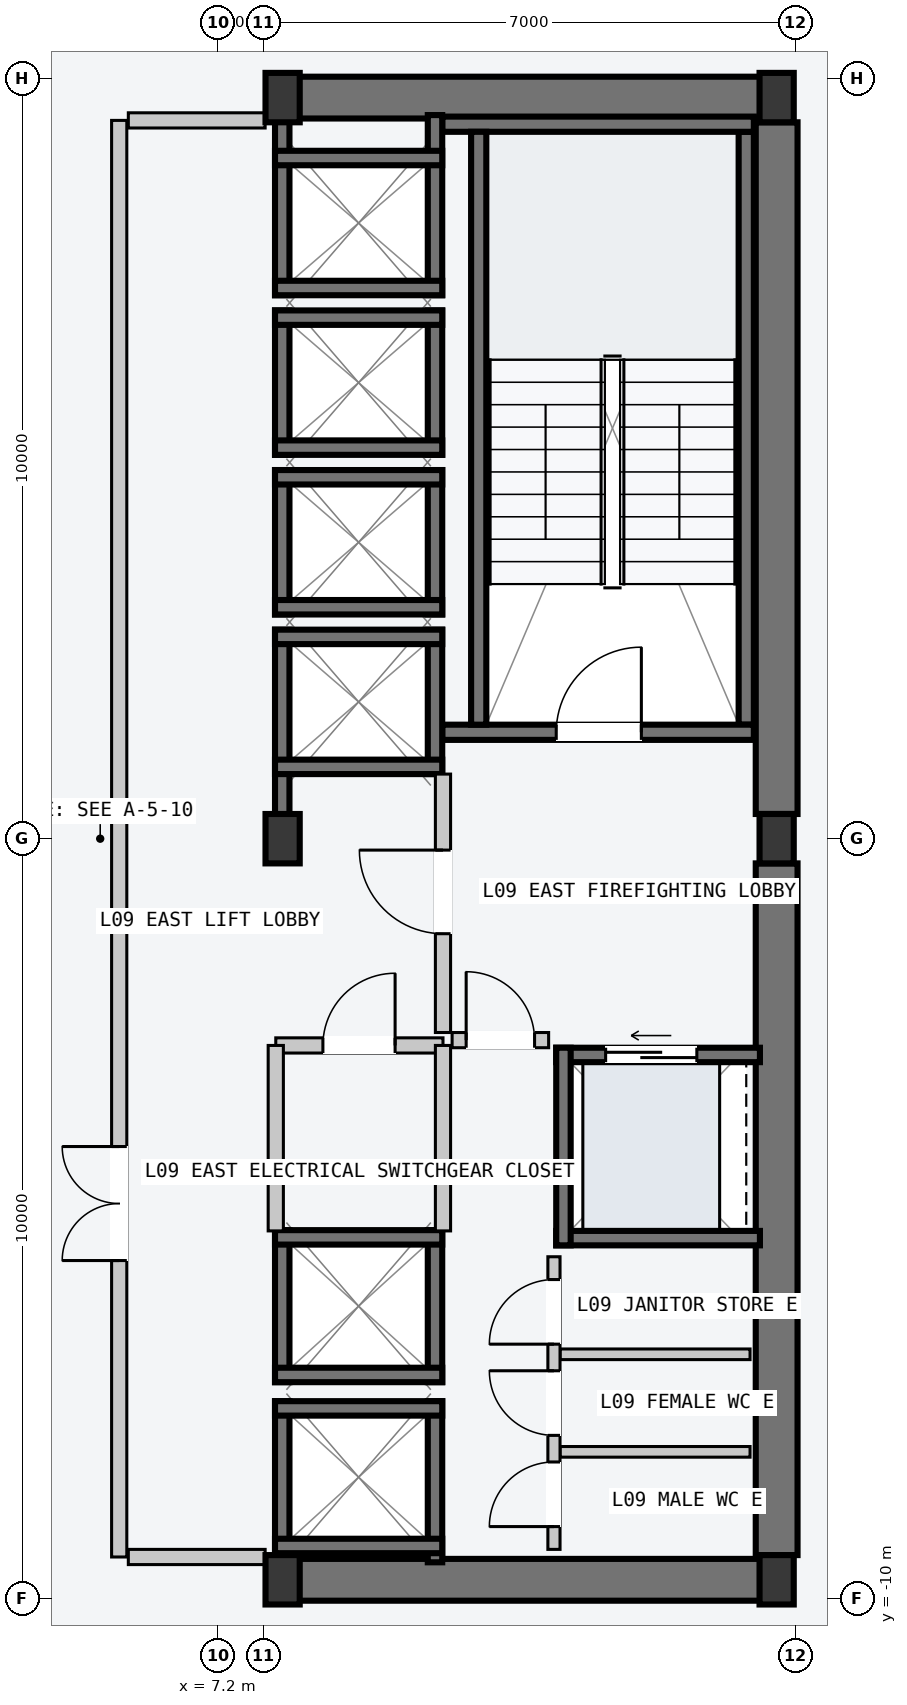
"""IFC4 building model, lengths in metres.
Left out: names, types, materials, properties, quantities, classifications, styles, units other than length and angle.
Written with IfcOpenShell. Run it as: python <this file> out.ifc"""

import sys

from ifc_helpers import new_model, si_unit, direction, frame, frame_2d, origin, origin_2d, place, context, subcontext, project, spatial, rectangle, i_section, extrude, element, fill, save


model = new_model("IFC4")
c1 = context("Model", 3, precision=1e-05, world=origin(), true_north=direction((0.0, 1.0)))
c2 = subcontext(c1, "Body", "Model", "MODEL_VIEW")
j1 = project(units=[si_unit("LENGTHUNIT", "METRE"), si_unit("PLANEANGLEUNIT", "RADIAN")], contexts=[c1])
p1 = place(None, origin())
s1 = spatial("IfcSite", under=j1, at=p1, CompositionType="ELEMENT")
p2 = place(p1, origin())
s2 = spatial("IfcBuilding", under=s1, at=p2, CompositionType="ELEMENT")
p3 = place(p2, frame((0.0, 0.0, 38.4)))
s3 = spatial("IfcBuildingStorey", under=s2, at=p3, CompositionType="ELEMENT", Elevation=38.4)
for number, where, z_axis, x_axis in (
    (1, (8.07, -9.75, -0.2), (0.0, 0.0, 1.0), (1.0, 0.0, 0.0)),
    (2, (8.07, 9.75, -0.2), (0.0, 0.0, 1.0), (1.0, 0.0, 0.0)),
):
    element("IfcWall", number, at=place(p3, frame(where, z_axis=z_axis, x_axis=x_axis)), inside=s3, PredefinedType="SHEAR", context=c2, shape_type="SweptSolid", body=[
        extrude(rectangle(XDim=6.46, YDim=0.55, at=frame_2d((3.23, 0.0))), origin(), (0.0, 0.0, 1.0), 3.6),
    ])
for number, where, z_axis, x_axis in (
    (3, (14.55, -9.425, -0.2), (0.0, 0.0, 1.0), (0.0, 1.0, 0.0)),
    (4, (14.55, 0.325, -0.2), (0.0, 0.0, 1.0), (0.0, 1.0, 0.0)),
):
    element("IfcWall", number, at=place(p3, frame(where, z_axis=z_axis, x_axis=x_axis)), inside=s3, PredefinedType="SHEAR", context=c2, shape_type="SweptSolid", body=[
        extrude(rectangle(XDim=9.1, YDim=0.55, at=frame_2d((4.55, 0.0))), origin(), (0.0, 0.0, 1.0), 3.6),
    ])
p4 = place(p3, frame((14.15, 1.5, -0.2), z_axis=(0.0, 0.0, 1.0), x_axis=(0.0, 1.0, 0.0)))
e5 = element("IfcWall", 5, at=p4, inside=s3, PredefinedType="SOLIDWALL", context=c2, shape_type="SweptSolid", body=[
    extrude(rectangle(XDim=7.8, YDim=0.2, at=frame_2d((3.9, 0.0))), origin(), (0.0, 0.0, 1.0), 3.6),
])
p5 = place(p3, frame((10.15, 1.4, -0.2), z_axis=(0.0, 0.0, 1.0), x_axis=(1.0, 0.0, 0.0)))
e6 = element("IfcWall", 6, at=p5, inside=s3, PredefinedType="SOLIDWALL", context=c2, shape_type="SweptSolid", body=[
    extrude(rectangle(XDim=4.1, YDim=0.2, at=frame_2d((2.05, 0.0))), origin(), (0.0, 0.0, 1.0), 3.6),
])
p6 = place(p5, frame((1.5, 0.0, 0.2)))
e7 = element("IfcOpeningElement", 7, at=p6, cuts=e6, PredefinedType="OPENING", context=c2, shape_type="SweptSolid", body=[
    extrude(rectangle(XDim=1.12, YDim=2.18, at=frame_2d((0.56, 1.09))), frame((0.0, 0.11, 0.0), z_axis=(0.0, -1.0, 0.0), x_axis=(1.0, 0.0, 0.0)), (0.0, 0.0, 1.0), 0.22),
])
p7 = place(p3, frame((10.15, 9.4, -0.2), z_axis=(0.0, 0.0, 1.0), x_axis=(1.0, 0.0, 0.0)))
e8 = element("IfcWall", 8, at=p7, inside=s3, PredefinedType="SOLIDWALL", context=c2, shape_type="SweptSolid", body=[
    extrude(rectangle(XDim=4.1, YDim=0.2, at=frame_2d((2.05, 0.0))), origin(), (0.0, 0.0, 1.0), 3.6),
])
p8 = place(p3, frame((10.63, 1.5, -0.2), z_axis=(0.0, 0.0, 1.0), x_axis=(0.0, 1.0, 0.0)))
e9 = element("IfcWall", 9, at=p8, inside=s3, PredefinedType="SOLIDWALL", context=c2, shape_type="SweptSolid", body=[
    extrude(rectangle(XDim=7.8, YDim=0.2, at=frame_2d((3.9, 0.0))), origin(), (0.0, 0.0, 1.0), 3.6),
])
for number, where, z_axis, x_axis in (
    (10, (8.05, -9.75, 0.0), (0.0, 0.0, 1.0), (1.0, 0.0, 0.0)),
    (11, (8.05, 0.0, 0.0), (0.0, 0.0, 1.0), (1.0, 0.0, 0.0)),
    (12, (8.05, 9.75, 0.0), (0.0, 0.0, 1.0), (1.0, 0.0, 0.0)),
    (13, (14.55, -9.75, 0.0), (0.0, 0.0, 1.0), (1.0, 0.0, 0.0)),
    (14, (14.55, 0.0, 0.0), (0.0, 0.0, 1.0), (1.0, 0.0, 0.0)),
    (15, (14.55, 9.75, 0.0), (0.0, 0.0, 1.0), (1.0, 0.0, 0.0)),
):
    element("IfcColumn", number, at=place(p3, frame(where, z_axis=z_axis, x_axis=x_axis)), inside=s3, PredefinedType="COLUMN", context=c2, shape_type="SweptSolid", body=[
        extrude(i_section(OverallWidth=0.45, OverallDepth=0.65, WebThickness=0.025, FlangeThickness=0.04, at=origin_2d()), origin(), (0.0, 0.0, 1.0), 3.6),
    ])
p9 = place(p3, frame((8.045, 0.21, -0.2), z_axis=(0.0, 0.0, 1.0), x_axis=(0.0, 1.0, 0.0)))
e16 = element("IfcWall", 16, at=p9, inside=s3, PredefinedType="SOLIDWALL", context=c2, shape_type="SweptSolid", body=[
    extrude(rectangle(XDim=2.54, YDim=0.19, at=frame_2d((1.27, 0.0))), origin(), (0.0, 0.0, 1.0), 3.6),
])
p10 = place(p3, frame((10.055, 0.85, -0.2), z_axis=(0.0, 0.0, 1.0), x_axis=(0.0, 1.0, 0.0)))
e17 = element("IfcWall", 17, at=p10, inside=s3, PredefinedType="SOLIDWALL", context=c2, shape_type="SweptSolid", body=[
    extrude(rectangle(XDim=1.9, YDim=0.19, at=frame_2d((0.95, 0.0))), origin(), (0.0, 0.0, 1.0), 3.6),
])
for number, where, z_axis, x_axis in (
    (18, (7.95, 2.655, -0.2), (0.0, 0.0, 1.0), (1.0, 0.0, 0.0)),
    (19, (7.95, 0.945, -0.2), (0.0, 0.0, 1.0), (1.0, 0.0, 0.0)),
):
    element("IfcWall", number, at=place(p3, frame(where, z_axis=z_axis, x_axis=x_axis)), inside=s3, PredefinedType="SOLIDWALL", context=c2, shape_type="SweptSolid", body=[
        extrude(rectangle(XDim=2.2, YDim=0.19, at=frame_2d((1.1, 0.0))), origin(), (0.0, 0.0, 1.0), 3.6),
    ])
for number, where, z_axis, x_axis in (
    (20, (8.045, 2.95, -0.2), (0.0, 0.0, 1.0), (0.0, 1.0, 0.0)),
    (21, (10.055, 2.95, -0.2), (0.0, 0.0, 1.0), (0.0, 1.0, 0.0)),
):
    element("IfcWall", number, at=place(p3, frame(where, z_axis=z_axis, x_axis=x_axis)), inside=s3, PredefinedType="SOLIDWALL", context=c2, shape_type="SweptSolid", body=[
        extrude(rectangle(XDim=1.9, YDim=0.19, at=frame_2d((0.95, 0.0))), origin(), (0.0, 0.0, 1.0), 3.6),
    ])
for number, where, z_axis, x_axis in (
    (22, (7.95, 4.755, -0.2), (0.0, 0.0, 1.0), (1.0, 0.0, 0.0)),
    (23, (7.95, 3.045, -0.2), (0.0, 0.0, 1.0), (1.0, 0.0, 0.0)),
):
    element("IfcWall", number, at=place(p3, frame(where, z_axis=z_axis, x_axis=x_axis)), inside=s3, PredefinedType="SOLIDWALL", context=c2, shape_type="SweptSolid", body=[
        extrude(rectangle(XDim=2.2, YDim=0.19, at=frame_2d((1.1, 0.0))), origin(), (0.0, 0.0, 1.0), 3.6),
    ])
for number, where, z_axis, x_axis in (
    (24, (8.045, 5.05, -0.2), (0.0, 0.0, 1.0), (0.0, 1.0, 0.0)),
    (25, (10.055, 5.05, -0.2), (0.0, 0.0, 1.0), (0.0, 1.0, 0.0)),
):
    element("IfcWall", number, at=place(p3, frame(where, z_axis=z_axis, x_axis=x_axis)), inside=s3, PredefinedType="SOLIDWALL", context=c2, shape_type="SweptSolid", body=[
        extrude(rectangle(XDim=1.9, YDim=0.19, at=frame_2d((0.95, 0.0))), origin(), (0.0, 0.0, 1.0), 3.6),
    ])
for number, where, z_axis, x_axis in (
    (26, (7.95, 6.855, -0.2), (0.0, 0.0, 1.0), (1.0, 0.0, 0.0)),
    (27, (7.95, 5.145, -0.2), (0.0, 0.0, 1.0), (1.0, 0.0, 0.0)),
):
    element("IfcWall", number, at=place(p3, frame(where, z_axis=z_axis, x_axis=x_axis)), inside=s3, PredefinedType="SOLIDWALL", context=c2, shape_type="SweptSolid", body=[
        extrude(rectangle(XDim=2.2, YDim=0.19, at=frame_2d((1.1, 0.0))), origin(), (0.0, 0.0, 1.0), 3.6),
    ])
for number, where, z_axis, x_axis in (
    (28, (8.045, 7.15, -0.2), (0.0, 0.0, 1.0), (0.0, 1.0, 0.0)),
    (29, (10.055, 7.15, -0.2), (0.0, 0.0, 1.0), (0.0, 1.0, 0.0)),
):
    element("IfcWall", number, at=place(p3, frame(where, z_axis=z_axis, x_axis=x_axis)), inside=s3, PredefinedType="SOLIDWALL", context=c2, shape_type="SweptSolid", body=[
        extrude(rectangle(XDim=2.37, YDim=0.19, at=frame_2d((1.185, 0.0))), origin(), (0.0, 0.0, 1.0), 3.6),
    ])
for number, where, z_axis, x_axis in (
    (30, (7.95, 8.955, -0.2), (0.0, 0.0, 1.0), (1.0, 0.0, 0.0)),
    (31, (7.95, 7.245, -0.2), (0.0, 0.0, 1.0), (1.0, 0.0, 0.0)),
):
    element("IfcWall", number, at=place(p3, frame(where, z_axis=z_axis, x_axis=x_axis)), inside=s3, PredefinedType="SOLIDWALL", context=c2, shape_type="SweptSolid", body=[
        extrude(rectangle(XDim=2.2, YDim=0.19, at=frame_2d((1.1, 0.0))), origin(), (0.0, 0.0, 1.0), 3.6),
    ])
for number, where, z_axis, x_axis in (
    (32, (8.045, -9.52, -0.2), (0.0, 0.0, 1.0), (0.0, 1.0, 0.0)),
    (33, (10.055, -9.52, -0.2), (0.0, 0.0, 1.0), (0.0, 1.0, 0.0)),
):
    element("IfcWall", number, at=place(p3, frame(where, z_axis=z_axis, x_axis=x_axis)), inside=s3, PredefinedType="SOLIDWALL", context=c2, shape_type="SweptSolid", body=[
        extrude(rectangle(XDim=2.12, YDim=0.19, at=frame_2d((1.06, 0.0))), origin(), (0.0, 0.0, 1.0), 3.6),
    ])
for number, where, z_axis, x_axis in (
    (34, (7.95, -7.495, -0.2), (0.0, 0.0, 1.0), (1.0, 0.0, 0.0)),
    (35, (7.95, -9.305, -0.2), (0.0, 0.0, 1.0), (1.0, 0.0, 0.0)),
):
    element("IfcWall", number, at=place(p3, frame(where, z_axis=z_axis, x_axis=x_axis)), inside=s3, PredefinedType="SOLIDWALL", context=c2, shape_type="SweptSolid", body=[
        extrude(rectangle(XDim=2.2, YDim=0.19, at=frame_2d((1.1, 0.0))), origin(), (0.0, 0.0, 1.0), 3.6),
    ])
for number, where, z_axis, x_axis in (
    (36, (8.045, -7.15, -0.2), (0.0, 0.0, 1.0), (0.0, 1.0, 0.0)),
    (37, (10.055, -7.15, -0.2), (0.0, 0.0, 1.0), (0.0, 1.0, 0.0)),
):
    element("IfcWall", number, at=place(p3, frame(where, z_axis=z_axis, x_axis=x_axis)), inside=s3, PredefinedType="SOLIDWALL", context=c2, shape_type="SweptSolid", body=[
        extrude(rectangle(XDim=2.0, YDim=0.19, at=frame_2d((1.0, 0.0))), origin(), (0.0, 0.0, 1.0), 3.6),
    ])
for number, where, z_axis, x_axis in (
    (38, (7.95, -5.245, -0.2), (0.0, 0.0, 1.0), (1.0, 0.0, 0.0)),
    (39, (7.95, -7.055, -0.2), (0.0, 0.0, 1.0), (1.0, 0.0, 0.0)),
):
    element("IfcWall", number, at=place(p3, frame(where, z_axis=z_axis, x_axis=x_axis)), inside=s3, PredefinedType="SOLIDWALL", context=c2, shape_type="SweptSolid", body=[
        extrude(rectangle(XDim=2.2, YDim=0.19, at=frame_2d((1.1, 0.0))), origin(), (0.0, 0.0, 1.0), 3.6),
    ])
p11 = place(p3, frame((11.65, -2.845, -0.2), z_axis=(0.0, 0.0, 1.0), x_axis=(1.0, 0.0, 0.0)))
e40 = element("IfcWall", 40, at=p11, inside=s3, PredefinedType="SOLIDWALL", context=c2, shape_type="SweptSolid", body=[
    extrude(rectangle(XDim=2.68, YDim=0.19, at=frame_2d((1.34, 0.0))), origin(), (0.0, 0.0, 1.0), 3.6),
])
p12 = place(p11, frame((0.65, 0.0, 0.2)))
e41 = element("IfcOpeningElement", 41, at=p12, cuts=e40, PredefinedType="OPENING", context=c2, shape_type="SweptSolid", body=[
    extrude(rectangle(XDim=1.2, YDim=2.2, at=frame_2d((0.6, 1.1))), frame((0.0, 0.105, 0.0), z_axis=(0.0, -1.0, 0.0), x_axis=(1.0, 0.0, 0.0)), (0.0, 0.0, 1.0), 0.21),
])
p13 = place(p3, frame((11.65, -5.255, -0.2), z_axis=(0.0, 0.0, 1.0), x_axis=(1.0, 0.0, 0.0)))
e42 = element("IfcWall", 42, at=p13, inside=s3, PredefinedType="SOLIDWALL", context=c2, shape_type="SweptSolid", body=[
    extrude(rectangle(XDim=2.68, YDim=0.19, at=frame_2d((1.34, 0.0))), origin(), (0.0, 0.0, 1.0), 3.6),
])
p14 = place(p3, frame((11.745, -5.35, -0.2), z_axis=(0.0, 0.0, 1.0), x_axis=(0.0, 1.0, 0.0)))
e43 = element("IfcWall", 43, at=p14, inside=s3, PredefinedType="SOLIDWALL", context=c2, shape_type="SweptSolid", body=[
    extrude(rectangle(XDim=2.6, YDim=0.19, at=frame_2d((1.3, 0.0))), origin(), (0.0, 0.0, 1.0), 3.6),
])
p15 = place(p3, frame((5.9, -9.45, 0.0), z_axis=(0.0, 0.0, 1.0), x_axis=(0.0, 1.0, 0.0)))
e44 = element("IfcWall", 44, at=p15, inside=s3, PredefinedType="PARTITIONING", context=c2, shape_type="SweptSolid", body=[
    extrude(rectangle(XDim=18.9, YDim=0.2, at=frame_2d((9.45, 0.0))), origin(), (0.0, 0.0, 1.0), 3.4),
])
p16 = place(p15, frame((3.9, 0.0, 0.0)))
e45 = element("IfcOpeningElement", 45, at=p16, cuts=e44, PredefinedType="OPENING", context=c2, shape_type="SweptSolid", body=[
    extrude(rectangle(XDim=1.5, YDim=2.2, at=frame_2d((0.75, 1.1))), frame((0.0, 0.11, 0.0), z_axis=(0.0, -1.0, 0.0), x_axis=(1.0, 0.0, 0.0)), (0.0, 0.0, 1.0), 0.22),
])
for number, where, z_axis, x_axis in (
    (46, (6.02, -9.45, 0.0), (0.0, 0.0, 1.0), (1.0, 0.0, 0.0)),
    (47, (6.02, 9.45, 0.0), (0.0, 0.0, 1.0), (1.0, 0.0, 0.0)),
):
    element("IfcWall", number, at=place(p3, frame(where, z_axis=z_axis, x_axis=x_axis)), inside=s3, PredefinedType="PARTITIONING", context=c2, shape_type="SweptSolid", body=[
        extrude(rectangle(XDim=1.8, YDim=0.2, at=frame_2d((0.9, 0.0))), origin(), (0.0, 0.0, 1.0), 3.4),
    ])
p17 = place(p3, frame((10.16, -2.55, 0.0), z_axis=(0.0, 0.0, 1.0), x_axis=(0.0, 1.0, 0.0)))
e48 = element("IfcWall", 48, at=p17, inside=s3, PredefinedType="PARTITIONING", context=c2, shape_type="SweptSolid", body=[
    extrude(rectangle(XDim=3.4, YDim=0.2, at=frame_2d((1.7, 0.0))), origin(), (0.0, 0.0, 1.0), 3.4),
])
p18 = place(p17, frame((1.3, 0.0, 0.0)))
e49 = element("IfcOpeningElement", 49, at=p18, cuts=e48, PredefinedType="OPENING", context=c2, shape_type="SweptSolid", body=[
    extrude(rectangle(XDim=1.1, YDim=2.15, at=frame_2d((0.55, 1.075))), frame((0.0, 0.11, 0.0), z_axis=(0.0, -1.0, 0.0), x_axis=(1.0, 0.0, 0.0)), (0.0, 0.0, 1.0), 0.22),
])
p19 = place(p3, frame((10.28, -2.65, 0.0), z_axis=(0.0, 0.0, 1.0), x_axis=(1.0, 0.0, 0.0)))
e50 = element("IfcWall", 50, at=p19, inside=s3, PredefinedType="PARTITIONING", context=c2, shape_type="SweptSolid", body=[
    extrude(rectangle(XDim=1.27, YDim=0.2, at=frame_2d((0.635, 0.0))), origin(), (0.0, 0.0, 1.0), 3.4),
])
p20 = place(p19, frame((0.185, 0.0, 0.0)))
e51 = element("IfcOpeningElement", 51, at=p20, cuts=e50, PredefinedType="OPENING", context=c2, shape_type="SweptSolid", body=[
    extrude(rectangle(XDim=0.9, YDim=2.15, at=frame_2d((0.45, 1.075))), frame((0.0, 0.11, 0.0), z_axis=(0.0, -1.0, 0.0), x_axis=(1.0, 0.0, 0.0)), (0.0, 0.0, 1.0), 0.22),
])
p21 = place(p3, frame((7.96, -2.72, 0.0), z_axis=(0.0, 0.0, 1.0), x_axis=(1.0, 0.0, 0.0)))
e52 = element("IfcWall", 52, at=p21, inside=s3, PredefinedType="PARTITIONING", context=c2, shape_type="SweptSolid", body=[
    extrude(rectangle(XDim=2.2, YDim=0.2, at=frame_2d((1.1, 0.0))), origin(), (0.0, 0.0, 1.0), 3.4),
])
p22 = place(p21, frame((0.62, 0.0, 0.0)))
e53 = element("IfcOpeningElement", 53, at=p22, cuts=e52, PredefinedType="OPENING", context=c2, shape_type="SweptSolid", body=[
    extrude(rectangle(XDim=0.95, YDim=2.1, at=frame_2d((0.475, 1.05))), frame((0.0, 0.11, 0.0), z_axis=(0.0, -1.0, 0.0), x_axis=(1.0, 0.0, 0.0)), (0.0, 0.0, 1.0), 0.22),
])
for number, where, z_axis, x_axis in (
    (54, (7.96, -5.16, 0.0), (0.0, 0.0, 1.0), (0.0, 1.0, 0.0)),
    (55, (10.16, -5.16, 0.0), (0.0, 0.0, 1.0), (0.0, 1.0, 0.0)),
):
    element("IfcWall", number, at=place(p3, frame(where, z_axis=z_axis, x_axis=x_axis)), inside=s3, PredefinedType="PARTITIONING", context=c2, shape_type="SweptSolid", body=[
        extrude(rectangle(XDim=2.44, YDim=0.2, at=frame_2d((1.22, 0.0))), origin(), (0.0, 0.0, 1.0), 3.4),
    ])
for number, where, z_axis, x_axis in (
    (56, (11.7, -8.067, 0.0), (0.0, 0.0, 1.0), (1.0, 0.0, 0.0)),
    (57, (11.7, -6.783, 0.0), (0.0, 0.0, 1.0), (1.0, 0.0, 0.0)),
):
    element("IfcWall", number, at=place(p3, frame(where, z_axis=z_axis, x_axis=x_axis)), inside=s3, PredefinedType="PARTITIONING", context=c2, shape_type="SweptSolid", body=[
        extrude(rectangle(XDim=2.5, YDim=0.14, at=frame_2d((1.25, 0.0))), origin(), (0.0, 0.0, 1.0), 3.4),
    ])
p23 = place(p3, frame((11.62, -9.35, 0.0), z_axis=(0.0, 0.0, 1.0), x_axis=(0.0, 1.0, 0.0)))
e58 = element("IfcWall", 58, at=p23, inside=s3, PredefinedType="PARTITIONING", context=c2, shape_type="SweptSolid", body=[
    extrude(rectangle(XDim=3.85, YDim=0.16, at=frame_2d((1.925, 0.0))), origin(), (0.0, 0.0, 1.0), 3.4),
])
p24 = place(p23, frame((0.3, 0.0, 0.0)))
e59 = element("IfcOpeningElement", 59, at=p24, cuts=e58, PredefinedType="OPENING", context=c2, shape_type="SweptSolid", body=[
    extrude(rectangle(XDim=0.85, YDim=2.12, at=frame_2d((0.425, 1.06))), frame((0.0, 0.09, 0.0), z_axis=(0.0, -1.0, 0.0), x_axis=(1.0, 0.0, 0.0)), (0.0, 0.0, 1.0), 0.18),
])
p25 = place(p23, frame((1.5, 0.0, 0.0)))
e60 = element("IfcOpeningElement", 60, at=p25, cuts=e58, PredefinedType="OPENING", context=c2, shape_type="SweptSolid", body=[
    extrude(rectangle(XDim=0.85, YDim=2.12, at=frame_2d((0.425, 1.06))), frame((0.0, 0.09, 0.0), z_axis=(0.0, -1.0, 0.0), x_axis=(1.0, 0.0, 0.0)), (0.0, 0.0, 1.0), 0.18),
])
p26 = place(p23, frame((2.7, 0.0, 0.0)))
e61 = element("IfcOpeningElement", 61, at=p26, cuts=e58, PredefinedType="OPENING", context=c2, shape_type="SweptSolid", body=[
    extrude(rectangle(XDim=0.85, YDim=2.12, at=frame_2d((0.425, 1.06))), frame((0.0, 0.09, 0.0), z_axis=(0.0, -1.0, 0.0), x_axis=(1.0, 0.0, 0.0)), (0.0, 0.0, 1.0), 0.18),
])
p27 = place(p6, origin())
e62 = element("IfcDoor", 62, at=p27, inside=s3, OperationType="SINGLE_SWING_RIGHT", PredefinedType="DOOR", context=c2, shape_type="SweptSolid", body=[
    extrude(rectangle(XDim=1.12, YDim=2.18, at=frame_2d((0.56, 1.09))), frame((0.0, 0.025, 0.0), z_axis=(0.0, -1.0, 0.0), x_axis=(1.0, 0.0, 0.0)), (0.0, 0.0, 1.0), 0.05),
])
fill(e7, e62)
p28 = place(p12, origin())
e63 = element("IfcDoor", 63, at=p28, inside=s3, OperationType="SLIDING_TO_LEFT", PredefinedType="DOOR", context=c2, shape_type="SweptSolid", body=[
    extrude(rectangle(XDim=1.2, YDim=2.2, at=frame_2d((0.6, 1.1))), frame((0.0, 0.025, 0.0), z_axis=(0.0, -1.0, 0.0), x_axis=(1.0, 0.0, 0.0)), (0.0, 0.0, 1.0), 0.05),
])
fill(e41, e63)
p29 = place(p16, origin())
e64 = element("IfcDoor", 64, at=p29, inside=s3, OperationType="DOUBLE_DOOR_SINGLE_SWING", PredefinedType="DOOR", context=c2, shape_type="SweptSolid", body=[
    extrude(rectangle(XDim=1.5, YDim=2.2, at=frame_2d((0.75, 1.1))), frame((0.0, 0.025, 0.0), z_axis=(0.0, -1.0, 0.0), x_axis=(1.0, 0.0, 0.0)), (0.0, 0.0, 1.0), 0.05),
])
fill(e45, e64)
p30 = place(p18, origin())
e65 = element("IfcDoor", 65, at=p30, inside=s3, OperationType="SINGLE_SWING_RIGHT", PredefinedType="DOOR", context=c2, shape_type="SweptSolid", body=[
    extrude(rectangle(XDim=1.1, YDim=2.15, at=frame_2d((0.55, 1.075))), frame((0.0, 0.025, 0.0), z_axis=(0.0, -1.0, 0.0), x_axis=(1.0, 0.0, 0.0)), (0.0, 0.0, 1.0), 0.05),
])
fill(e49, e65)
p31 = place(p20, origin())
e66 = element("IfcDoor", 66, at=p31, inside=s3, OperationType="SINGLE_SWING_LEFT", PredefinedType="DOOR", context=c2, shape_type="SweptSolid", body=[
    extrude(rectangle(XDim=0.9, YDim=2.15, at=frame_2d((0.45, 1.075))), frame((0.0, 0.025, 0.0), z_axis=(0.0, -1.0, 0.0), x_axis=(1.0, 0.0, 0.0)), (0.0, 0.0, 1.0), 0.05),
])
fill(e51, e66)
p32 = place(p22, origin())
e67 = element("IfcDoor", 67, at=p32, inside=s3, OperationType="SINGLE_SWING_RIGHT", PredefinedType="DOOR", context=c2, shape_type="SweptSolid", body=[
    extrude(rectangle(XDim=0.95, YDim=2.1, at=frame_2d((0.475, 1.05))), frame((0.0, 0.025, 0.0), z_axis=(0.0, -1.0, 0.0), x_axis=(1.0, 0.0, 0.0)), (0.0, 0.0, 1.0), 0.05),
])
fill(e53, e67)
p33 = place(p24, origin())
e68 = element("IfcDoor", 68, at=p33, inside=s3, OperationType="SINGLE_SWING_LEFT", PredefinedType="DOOR", context=c2, shape_type="SweptSolid", body=[
    extrude(rectangle(XDim=0.85, YDim=2.12, at=frame_2d((0.425, 1.06))), frame((0.0, 0.025, 0.0), z_axis=(0.0, -1.0, 0.0), x_axis=(1.0, 0.0, 0.0)), (0.0, 0.0, 1.0), 0.05),
])
fill(e59, e68)
p34 = place(p25, origin())
e69 = element("IfcDoor", 69, at=p34, inside=s3, OperationType="SINGLE_SWING_RIGHT", PredefinedType="DOOR", context=c2, shape_type="SweptSolid", body=[
    extrude(rectangle(XDim=0.85, YDim=2.12, at=frame_2d((0.425, 1.06))), frame((0.0, 0.025, 0.0), z_axis=(0.0, -1.0, 0.0), x_axis=(1.0, 0.0, 0.0)), (0.0, 0.0, 1.0), 0.05),
])
fill(e60, e69)
p35 = place(p26, origin())
e70 = element("IfcDoor", 70, at=p35, inside=s3, OperationType="SINGLE_SWING_LEFT", PredefinedType="DOOR", context=c2, shape_type="SweptSolid", body=[
    extrude(rectangle(XDim=0.85, YDim=2.12, at=frame_2d((0.425, 1.06))), frame((0.0, 0.025, 0.0), z_axis=(0.0, -1.0, 0.0), x_axis=(1.0, 0.0, 0.0)), (0.0, 0.0, 1.0), 0.05),
])
fill(e61, e70)
save(model, sys.argv[1])
